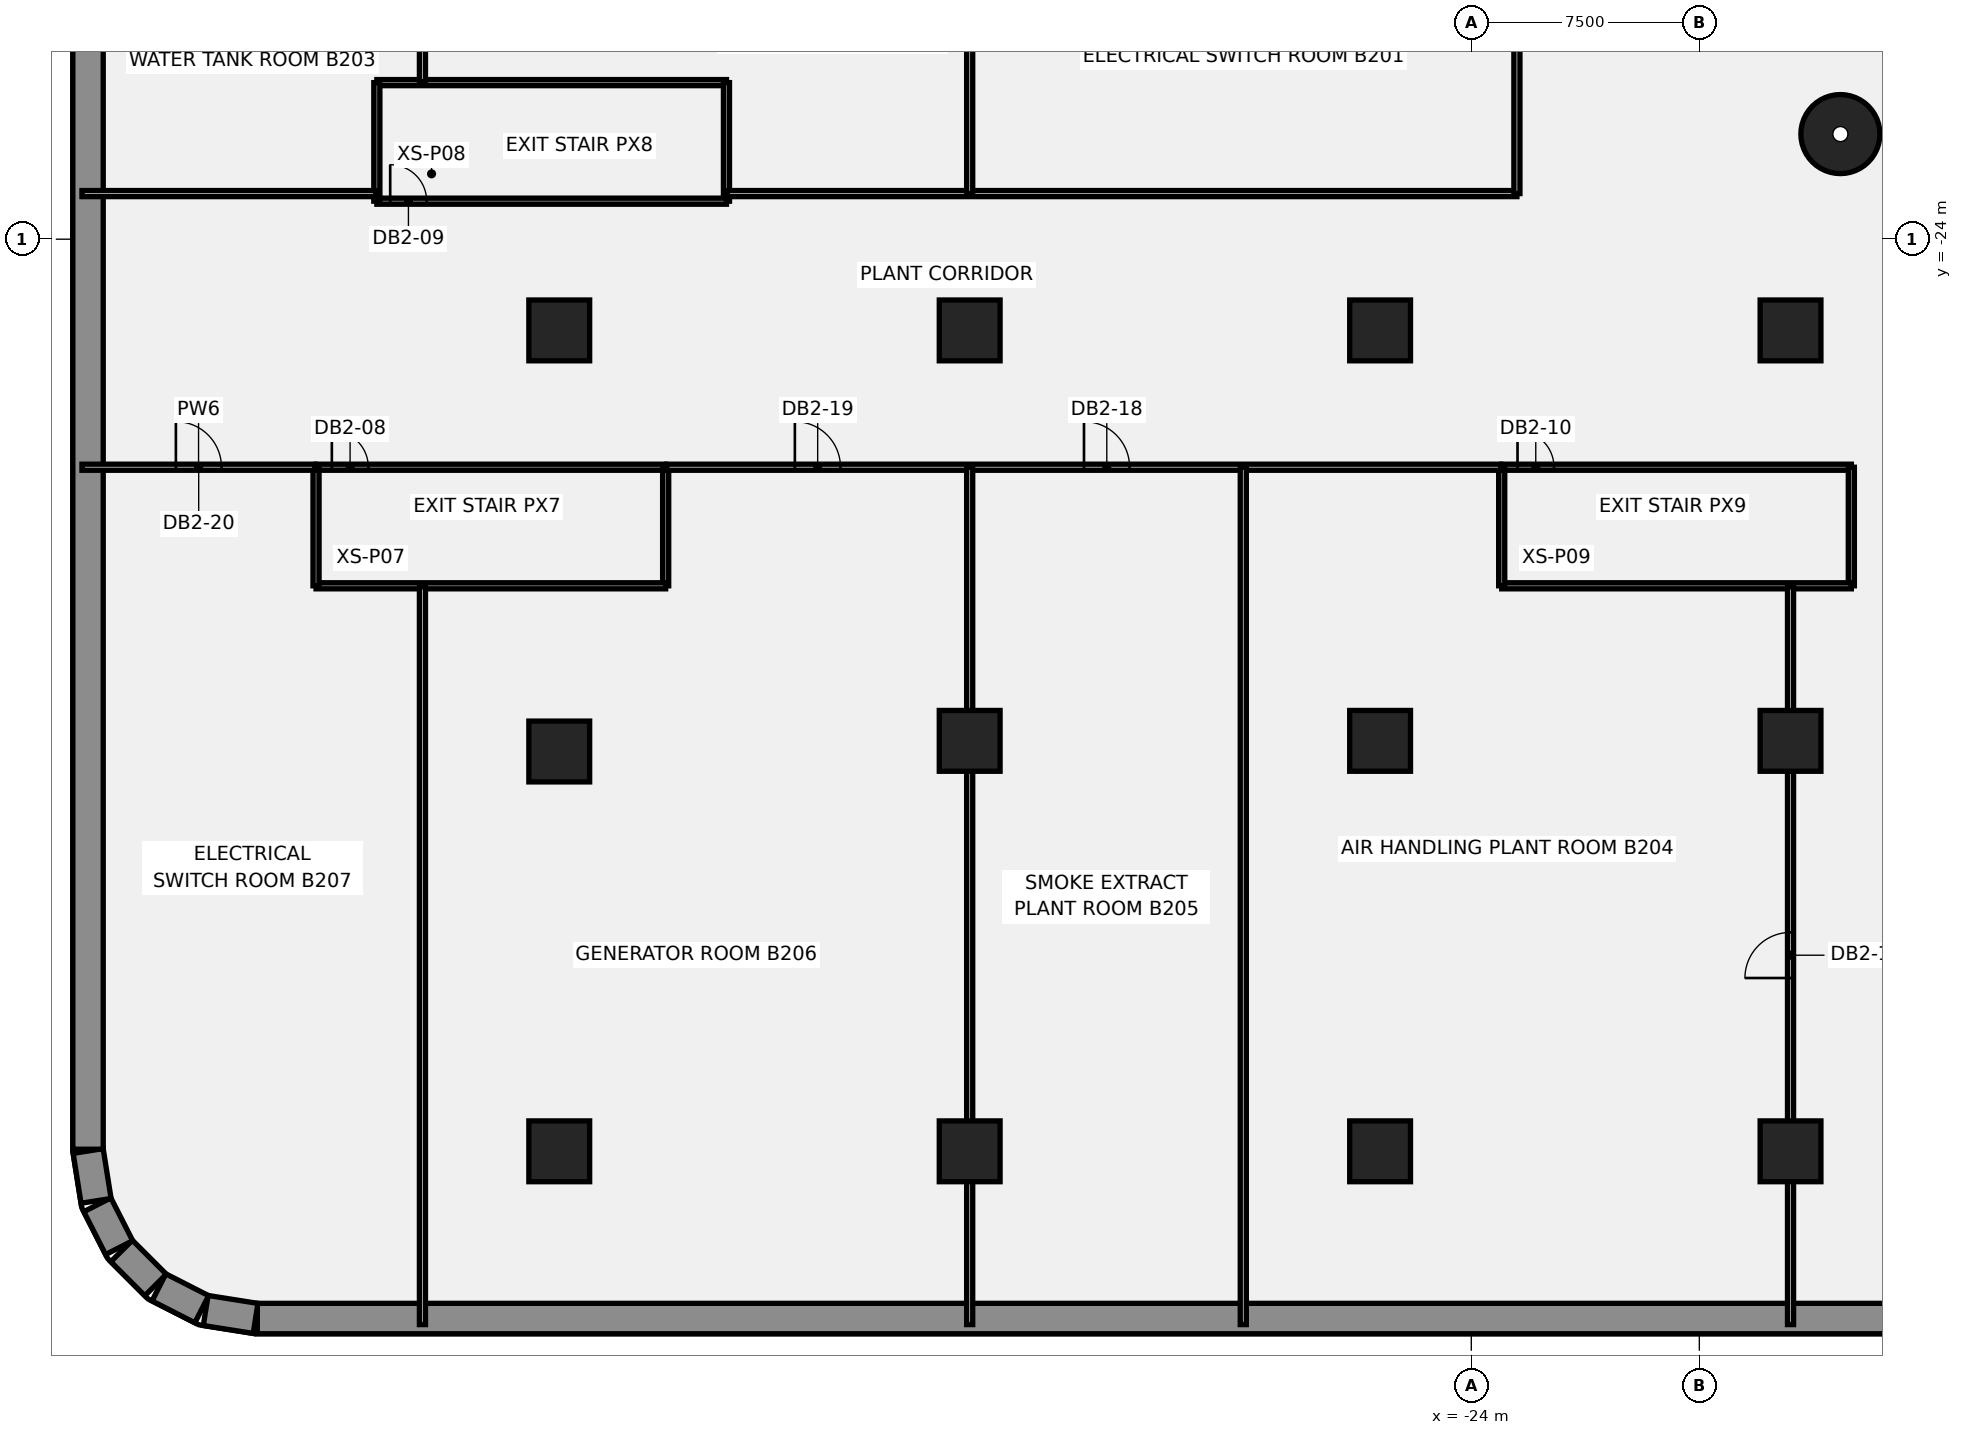
"""IFC4 building model, lengths in metres.
Left out: names, types, materials, properties, quantities, classifications, styles, units other than length and angle.
Written with IfcOpenShell. Run it as: python <this file> out.ifc"""

import sys

from ifc_helpers import new_model, si_unit, direction, frame, frame_2d, origin, origin_2d, place, context, subcontext, project, spatial, rectangle, circle, extrude, element, fill, save


model = new_model("IFC4")
c1 = context("Model", 3, precision=1e-05, world=origin(), true_north=direction((0.0, 1.0)))
c2 = subcontext(c1, "Body", "Model", "MODEL_VIEW")
j1 = project(units=[si_unit("LENGTHUNIT", "METRE"), si_unit("PLANEANGLEUNIT", "RADIAN")], contexts=[c1])
p1 = place(None, origin())
s1 = spatial("IfcSite", under=j1, at=p1, CompositionType="ELEMENT")
p2 = place(p1, origin())
s2 = spatial("IfcBuilding", under=s1, at=p2, CompositionType="ELEMENT")
p3 = place(p2, frame((0.0, 0.0, -14.0)))
s3 = spatial("IfcBuildingStorey", under=s2, at=p3, CompositionType="ELEMENT", Elevation=-14.0)
p4 = place(p3, frame((63.931, -59.5, -0.45), z_axis=(0.0, 0.0, 1.0), x_axis=(-1.0, 0.0, 0.0)))
e1 = element("IfcWall", 1, at=p4, inside=s3, PredefinedType="SOLIDWALL", context=c2, shape_type="SweptSolid", body=[
    extrude(rectangle(XDim=127.863, YDim=1.0, at=frame_2d((63.931, 0.0))), origin(), (0.0, 0.0, 1.0), 7.0),
])
p5 = place(p3, frame((-63.99, -59.495, -0.45), z_axis=(0.0, 0.0, 1.0), x_axis=(-0.987688946427, 0.156430639922, 0.0)))
e2 = element("IfcWall", 2, at=p5, inside=s3, PredefinedType="SOLIDWALL", context=c2, shape_type="SweptSolid", body=[
    extrude(rectangle(XDim=1.661, YDim=1.0, at=frame_2d((0.83, 0.0))), origin(), (0.0, 0.0, 1.0), 7.0),
])
for number, where, z_axis, x_axis in (
    (3, (-65.759, -59.194, -0.45), (0.0, 0.0, 1.0), (-0.891, 0.454, 0.0)),
    (4, (-67.278, -58.396, -0.45), (0.0, 0.0, 1.0), (-0.707, 0.707, 0.0)),
    (5, (-68.476, -57.168, -0.45), (0.0, 0.0, 1.0), (-0.454, 0.891, 0.0)),
):
    element("IfcWall", number, at=place(p3, frame(where, z_axis=z_axis, x_axis=x_axis)), inside=s3, PredefinedType="SOLIDWALL", context=c2, shape_type="SweptSolid", body=[
        extrude(rectangle(XDim=1.581, YDim=1.0, at=frame_2d((0.791, 0.0))), origin(), (0.0, 0.0, 1.0), 7.0),
    ])
p6 = place(p3, frame((-69.236, -55.63, -0.45), z_axis=(0.0, 0.0, 1.0), x_axis=(-0.156430639922, 0.987688946427, 0.0)))
e6 = element("IfcWall", 6, at=p6, inside=s3, PredefinedType="SOLIDWALL", context=c2, shape_type="SweptSolid", body=[
    extrude(rectangle(XDim=1.661, YDim=1.0, at=frame_2d((0.83, 0.0))), origin(), (0.0, 0.0, 1.0), 7.0),
])
p7 = place(p3, frame((-69.5, -53.931, -0.45), z_axis=(0.0, 0.0, 1.0), x_axis=(0.0, 1.0, 0.0)))
e7 = element("IfcWall", 7, at=p7, inside=s3, PredefinedType="SOLIDWALL", context=c2, shape_type="SweptSolid", body=[
    extrude(rectangle(XDim=107.863, YDim=1.0, at=frame_2d((53.931, 0.0))), origin(), (0.0, 0.0, 1.0), 7.0),
])
p8 = place(p3, frame((-11.86, -20.543, -0.45), z_axis=(0.0, 0.0, 1.0), x_axis=(1.0, 0.0, 0.0)))
e8 = element("IfcColumn", 8, at=p8, inside=s3, PredefinedType="COLUMN", context=c2, shape_type="SweptSolid", body=[
    extrude(circle(Radius=1.3, at=origin_2d()), origin(), (0.0, 0.0, 1.0), 7.0),
])
for number, where, z_axis, x_axis in (
    (9, (-54.0, -54.0, -0.45), (0.0, 0.0, 1.0), (1.0, 0.0, 0.0)),
    (10, (-54.0, -40.85, -0.45), (0.0, 0.0, 1.0), (1.0, 0.0, 0.0)),
    (11, (-54.0, -27.0, -0.45), (0.0, 0.0, 1.0), (1.0, 0.0, 0.0)),
    (12, (-40.5, -54.0, -0.45), (0.0, 0.0, 1.0), (1.0, 0.0, 0.0)),
    (13, (-40.5, -40.5, -0.45), (0.0, 0.0, 1.0), (1.0, 0.0, 0.0)),
    (14, (-40.5, -27.0, -0.45), (0.0, 0.0, 1.0), (1.0, 0.0, 0.0)),
    (15, (-27.0, -54.0, -0.45), (0.0, 0.0, 1.0), (1.0, 0.0, 0.0)),
    (16, (-27.0, -40.5, -0.45), (0.0, 0.0, 1.0), (1.0, 0.0, 0.0)),
    (17, (-27.0, -27.0, -0.45), (0.0, 0.0, 1.0), (1.0, 0.0, 0.0)),
    (18, (-13.5, -54.0, -0.45), (0.0, 0.0, 1.0), (1.0, 0.0, 0.0)),
    (19, (-13.5, -40.5, -0.45), (0.0, 0.0, 1.0), (1.0, 0.0, 0.0)),
    (20, (-13.5, -27.0, -0.45), (0.0, 0.0, 1.0), (1.0, 0.0, 0.0)),
):
    element("IfcColumn", number, at=place(p3, frame(where, z_axis=z_axis, x_axis=x_axis)), inside=s3, PredefinedType="COLUMN", context=c2, shape_type="SweptSolid", body=[
        extrude(rectangle(XDim=2.0, YDim=2.0, at=origin_2d()), origin(), (0.0, 0.0, 1.0), 7.0),
    ])
p9 = place(p3, frame((-62.0, -31.5, 0.0), z_axis=(0.0, 0.0, 1.0), x_axis=(1.0, 0.0, 0.0)))
e21 = element("IfcWall", 21, at=p9, inside=s3, PredefinedType="PARTITIONING", context=c2, shape_type="SweptSolid", body=[
    extrude(rectangle(XDim=11.5, YDim=0.2, at=frame_2d((5.75, 0.0))), origin(), (0.0, 0.0, 1.0), 6.55),
])
p10 = place(p9, frame((0.52, 0.0, 0.0)))
e22 = element("IfcOpeningElement", 22, at=p10, cuts=e21, PredefinedType="OPENING", context=c2, shape_type="SweptSolid", body=[
    extrude(rectangle(XDim=1.2, YDim=2.1, at=frame_2d((0.6, 1.05))), frame((0.0, 0.11, 0.0), z_axis=(0.0, -1.0, 0.0), x_axis=(1.0, 0.0, 0.0)), (0.0, 0.0, 1.0), 0.22),
])
p11 = place(p3, frame((-50.5, -35.4, 0.0), z_axis=(0.0, 0.0, 1.0), x_axis=(0.0, 1.0, 0.0)))
e23 = element("IfcWall", 23, at=p11, inside=s3, PredefinedType="PARTITIONING", context=c2, shape_type="SweptSolid", body=[
    extrude(rectangle(XDim=3.9, YDim=0.2, at=frame_2d((1.95, 0.0))), origin(), (0.0, 0.0, 1.0), 6.55),
])
p12 = place(p3, frame((-62.0, -35.4, 0.0), z_axis=(0.0, 0.0, 1.0), x_axis=(1.0, 0.0, 0.0)))
e24 = element("IfcWall", 24, at=p12, inside=s3, PredefinedType="PARTITIONING", context=c2, shape_type="SweptSolid", body=[
    extrude(rectangle(XDim=11.5, YDim=0.2, at=frame_2d((5.75, 0.0))), origin(), (0.0, 0.0, 1.0), 6.55),
])
p13 = place(p3, frame((-62.0, -35.4, 0.0), z_axis=(0.0, 0.0, 1.0), x_axis=(0.0, 1.0, 0.0)))
e25 = element("IfcWall", 25, at=p13, inside=s3, PredefinedType="PARTITIONING", context=c2, shape_type="SweptSolid", body=[
    extrude(rectangle(XDim=3.9, YDim=0.2, at=frame_2d((1.95, 0.0))), origin(), (0.0, 0.0, 1.0), 6.55),
])
p14 = place(p3, frame((-60.0, -18.85, 0.0), z_axis=(0.0, 0.0, 1.0), x_axis=(1.0, 0.0, 0.0)))
e26 = element("IfcWall", 26, at=p14, inside=s3, PredefinedType="PARTITIONING", context=c2, shape_type="SweptSolid", body=[
    extrude(rectangle(XDim=11.5, YDim=0.2, at=frame_2d((5.75, 0.0))), origin(), (0.0, 0.0, 1.0), 6.55),
])
p15 = place(p3, frame((-48.5, -22.75, 0.0), z_axis=(0.0, 0.0, 1.0), x_axis=(0.0, 1.0, 0.0)))
e27 = element("IfcWall", 27, at=p15, inside=s3, PredefinedType="PARTITIONING", context=c2, shape_type="SweptSolid", body=[
    extrude(rectangle(XDim=3.9, YDim=0.2, at=frame_2d((1.95, 0.0))), origin(), (0.0, 0.0, 1.0), 6.55),
])
p16 = place(p3, frame((-60.0, -22.75, 0.0), z_axis=(0.0, 0.0, 1.0), x_axis=(1.0, 0.0, 0.0)))
e28 = element("IfcWall", 28, at=p16, inside=s3, PredefinedType="PARTITIONING", context=c2, shape_type="SweptSolid", body=[
    extrude(rectangle(XDim=11.5, YDim=0.2, at=frame_2d((5.75, 0.0))), origin(), (0.0, 0.0, 1.0), 6.55),
])
p17 = place(p16, frame((0.439, 0.0, 0.0)))
e29 = element("IfcOpeningElement", 29, at=p17, cuts=e28, PredefinedType="OPENING", context=c2, shape_type="SweptSolid", body=[
    extrude(rectangle(XDim=1.2, YDim=2.1, at=frame_2d((0.6, 1.05))), frame((0.0, 0.11, 0.0), z_axis=(0.0, -1.0, 0.0), x_axis=(1.0, 0.0, 0.0)), (0.0, 0.0, 1.0), 0.22),
])
p18 = place(p3, frame((-60.0, -22.75, 0.0), z_axis=(0.0, 0.0, 1.0), x_axis=(0.0, 1.0, 0.0)))
e30 = element("IfcWall", 30, at=p18, inside=s3, PredefinedType="PARTITIONING", context=c2, shape_type="SweptSolid", body=[
    extrude(rectangle(XDim=3.9, YDim=0.2, at=frame_2d((1.95, 0.0))), origin(), (0.0, 0.0, 1.0), 6.55),
])
p19 = place(p3, frame((-23.0, -31.5, 0.0), z_axis=(0.0, 0.0, 1.0), x_axis=(1.0, 0.0, 0.0)))
e31 = element("IfcWall", 31, at=p19, inside=s3, PredefinedType="PARTITIONING", context=c2, shape_type="SweptSolid", body=[
    extrude(rectangle(XDim=11.5, YDim=0.2, at=frame_2d((5.75, 0.0))), origin(), (0.0, 0.0, 1.0), 6.55),
])
p20 = place(p19, frame((0.52, 0.0, 0.0)))
e32 = element("IfcOpeningElement", 32, at=p20, cuts=e31, PredefinedType="OPENING", context=c2, shape_type="SweptSolid", body=[
    extrude(rectangle(XDim=1.2, YDim=2.1, at=frame_2d((0.6, 1.05))), frame((0.0, 0.11, 0.0), z_axis=(0.0, -1.0, 0.0), x_axis=(1.0, 0.0, 0.0)), (0.0, 0.0, 1.0), 0.22),
])
p21 = place(p3, frame((-11.5, -35.4, 0.0), z_axis=(0.0, 0.0, 1.0), x_axis=(0.0, 1.0, 0.0)))
e33 = element("IfcWall", 33, at=p21, inside=s3, PredefinedType="PARTITIONING", context=c2, shape_type="SweptSolid", body=[
    extrude(rectangle(XDim=3.9, YDim=0.2, at=frame_2d((1.95, 0.0))), origin(), (0.0, 0.0, 1.0), 6.55),
])
p22 = place(p3, frame((-23.0, -35.4, 0.0), z_axis=(0.0, 0.0, 1.0), x_axis=(1.0, 0.0, 0.0)))
e34 = element("IfcWall", 34, at=p22, inside=s3, PredefinedType="PARTITIONING", context=c2, shape_type="SweptSolid", body=[
    extrude(rectangle(XDim=11.5, YDim=0.2, at=frame_2d((5.75, 0.0))), origin(), (0.0, 0.0, 1.0), 6.55),
])
p23 = place(p3, frame((-23.0, -35.4, 0.0), z_axis=(0.0, 0.0, 1.0), x_axis=(0.0, 1.0, 0.0)))
e35 = element("IfcWall", 35, at=p23, inside=s3, PredefinedType="PARTITIONING", context=c2, shape_type="SweptSolid", body=[
    extrude(rectangle(XDim=3.9, YDim=0.2, at=frame_2d((1.95, 0.0))), origin(), (0.0, 0.0, 1.0), 6.55),
])
p24 = place(p3, frame((-69.699, -31.5, 0.0), z_axis=(0.0, 0.0, 1.0), x_axis=(1.0, 0.0, 0.0)))
e36 = element("IfcWall", 36, at=p24, inside=s3, PredefinedType="PARTITIONING", context=c2, shape_type="SweptSolid", body=[
    extrude(rectangle(XDim=7.669, YDim=0.2, at=frame_2d((3.834, 0.0))), origin(), (0.0, 0.0, 1.0), 6.55),
])
p25 = place(p24, frame((3.089, 0.0, 0.0)))
e37 = element("IfcOpeningElement", 37, at=p25, cuts=e36, PredefinedType="OPENING", context=c2, shape_type="SweptSolid", body=[
    extrude(rectangle(XDim=1.5, YDim=2.1, at=frame_2d((0.75, 1.05))), frame((0.0, 0.11, 0.0), z_axis=(0.0, -1.0, 0.0), x_axis=(1.0, 0.0, 0.0)), (0.0, 0.0, 1.0), 0.22),
])
p26 = place(p3, frame((-69.699, -22.5, 0.0), z_axis=(0.0, 0.0, 1.0), x_axis=(1.0, 0.0, 0.0)))
e38 = element("IfcWall", 38, at=p26, inside=s3, PredefinedType="PARTITIONING", context=c2, shape_type="SweptSolid", body=[
    extrude(rectangle(XDim=9.669, YDim=0.2, at=frame_2d((4.834, 0.0))), origin(), (0.0, 0.0, 1.0), 6.55),
])
p27 = place(p3, frame((-58.5, -59.699, 0.0), z_axis=(0.0, 0.0, 1.0), x_axis=(0.0, 1.0, 0.0)))
e39 = element("IfcWall", 39, at=p27, inside=s3, PredefinedType="PARTITIONING", context=c2, shape_type="SweptSolid", body=[
    extrude(rectangle(XDim=24.269, YDim=0.2, at=frame_2d((12.135, 0.0))), origin(), (0.0, 0.0, 1.0), 6.55),
])
p28 = place(p3, frame((-58.5, -18.82, 0.0), z_axis=(0.0, 0.0, 1.0), x_axis=(0.0, 1.0, 0.0)))
e40 = element("IfcWall", 40, at=p28, inside=s3, PredefinedType="PARTITIONING", context=c2, shape_type="SweptSolid", body=[
    extrude(rectangle(XDim=5.32, YDim=0.2, at=frame_2d((2.66, 0.0))), origin(), (0.0, 0.0, 1.0), 6.55),
])
p29 = place(p3, frame((-50.47, -31.5, 0.0), z_axis=(0.0, 0.0, 1.0), x_axis=(1.0, 0.0, 0.0)))
e41 = element("IfcWall", 41, at=p29, inside=s3, PredefinedType="PARTITIONING", context=c2, shape_type="SweptSolid", body=[
    extrude(rectangle(XDim=27.44, YDim=0.2, at=frame_2d((13.72, 0.0))), origin(), (0.0, 0.0, 1.0), 6.55),
])
p30 = place(p29, frame((13.73, 0.0, 0.0)))
e42 = element("IfcOpeningElement", 42, at=p30, cuts=e41, PredefinedType="OPENING", context=c2, shape_type="SweptSolid", body=[
    extrude(rectangle(XDim=1.5, YDim=2.1, at=frame_2d((0.75, 1.05))), frame((0.0, 0.11, 0.0), z_axis=(0.0, -1.0, 0.0), x_axis=(1.0, 0.0, 0.0)), (0.0, 0.0, 1.0), 0.22),
])
p31 = place(p29, frame((4.22, 0.0, 0.0)))
e43 = element("IfcOpeningElement", 43, at=p31, cuts=e41, PredefinedType="OPENING", context=c2, shape_type="SweptSolid", body=[
    extrude(rectangle(XDim=1.5, YDim=2.1, at=frame_2d((0.75, 1.05))), frame((0.0, 0.11, 0.0), z_axis=(0.0, -1.0, 0.0), x_axis=(1.0, 0.0, 0.0)), (0.0, 0.0, 1.0), 0.22),
])
p32 = place(p3, frame((-48.47, -22.5, 0.0), z_axis=(0.0, 0.0, 1.0), x_axis=(1.0, 0.0, 0.0)))
e44 = element("IfcWall", 44, at=p32, inside=s3, PredefinedType="PARTITIONING", context=c2, shape_type="SweptSolid", body=[
    extrude(rectangle(XDim=25.97, YDim=0.2, at=frame_2d((12.985, 0.0))), origin(), (0.0, 0.0, 1.0), 6.55),
])
p33 = place(p3, frame((-40.5, -59.699, 0.0), z_axis=(0.0, 0.0, 1.0), x_axis=(0.0, 1.0, 0.0)))
e45 = element("IfcWall", 45, at=p33, inside=s3, PredefinedType="PARTITIONING", context=c2, shape_type="SweptSolid", body=[
    extrude(rectangle(XDim=28.199, YDim=0.2, at=frame_2d((14.1, 0.0))), origin(), (0.0, 0.0, 1.0), 6.55),
])
for number, where, z_axis, x_axis in (
    (46, (-22.5, -22.5, 0.0), (0.0, 0.0, 1.0), (0.0, 1.0, 0.0)),
    (47, (-40.5, -22.5, 0.0), (0.0, 0.0, 1.0), (0.0, 1.0, 0.0)),
):
    element("IfcWall", number, at=place(p3, frame(where, z_axis=z_axis, x_axis=x_axis)), inside=s3, PredefinedType="PARTITIONING", context=c2, shape_type="SweptSolid", body=[
        extrude(rectangle(XDim=9.0, YDim=0.2, at=frame_2d((4.5, 0.0))), origin(), (0.0, 0.0, 1.0), 6.55),
    ])
p34 = place(p3, frame((-31.5, -59.699, 0.0), z_axis=(0.0, 0.0, 1.0), x_axis=(0.0, 1.0, 0.0)))
e48 = element("IfcWall", 48, at=p34, inside=s3, PredefinedType="PARTITIONING", context=c2, shape_type="SweptSolid", body=[
    extrude(rectangle(XDim=28.199, YDim=0.2, at=frame_2d((14.1, 0.0))), origin(), (0.0, 0.0, 1.0), 6.55),
])
p35 = place(p3, frame((-13.5, -59.699, 0.0), z_axis=(0.0, 0.0, 1.0), x_axis=(0.0, 1.0, 0.0)))
e49 = element("IfcWall", 49, at=p35, inside=s3, PredefinedType="PARTITIONING", context=c2, shape_type="SweptSolid", body=[
    extrude(rectangle(XDim=24.269, YDim=0.2, at=frame_2d((12.135, 0.0))), origin(), (0.0, 0.0, 1.0), 6.55),
])
p36 = place(p35, frame((11.399, 0.0, 0.0)))
e50 = element("IfcOpeningElement", 50, at=p36, cuts=e49, PredefinedType="OPENING", context=c2, shape_type="SweptSolid", body=[
    extrude(rectangle(XDim=1.5, YDim=2.1, at=frame_2d((0.75, 1.05))), frame((0.0, 0.11, 0.0), z_axis=(0.0, -1.0, 0.0), x_axis=(1.0, 0.0, 0.0)), (0.0, 0.0, 1.0), 0.22),
])
p37 = place(p10, origin())
e51 = element("IfcDoor", 51, at=p37, inside=s3, OperationType="SINGLE_SWING_RIGHT", PredefinedType="DOOR", context=c2, shape_type="SweptSolid", body=[
    extrude(rectangle(XDim=1.2, YDim=2.1, at=frame_2d((0.6, 1.05))), frame((0.0, 0.025, 0.0), z_axis=(0.0, -1.0, 0.0), x_axis=(1.0, 0.0, 0.0)), (0.0, 0.0, 1.0), 0.05),
])
fill(e22, e51)
p38 = place(p17, origin())
e52 = element("IfcDoor", 52, at=p38, inside=s3, OperationType="SINGLE_SWING_LEFT", PredefinedType="DOOR", context=c2, shape_type="SweptSolid", body=[
    extrude(rectangle(XDim=1.2, YDim=2.1, at=frame_2d((0.6, 1.05))), frame((0.0, 0.025, 0.0), z_axis=(0.0, -1.0, 0.0), x_axis=(1.0, 0.0, 0.0)), (0.0, 0.0, 1.0), 0.05),
])
fill(e29, e52)
p39 = place(p20, origin())
e53 = element("IfcDoor", 53, at=p39, inside=s3, OperationType="SINGLE_SWING_RIGHT", PredefinedType="DOOR", context=c2, shape_type="SweptSolid", body=[
    extrude(rectangle(XDim=1.2, YDim=2.1, at=frame_2d((0.6, 1.05))), frame((0.0, 0.025, 0.0), z_axis=(0.0, -1.0, 0.0), x_axis=(1.0, 0.0, 0.0)), (0.0, 0.0, 1.0), 0.05),
])
fill(e32, e53)
p40 = place(p36, origin())
e54 = element("IfcDoor", 54, at=p40, inside=s3, OperationType="SINGLE_SWING_LEFT", PredefinedType="DOOR", context=c2, shape_type="SweptSolid", body=[
    extrude(rectangle(XDim=1.5, YDim=2.1, at=frame_2d((0.75, 1.05))), frame((0.0, 0.025, 0.0), z_axis=(0.0, -1.0, 0.0), x_axis=(1.0, 0.0, 0.0)), (0.0, 0.0, 1.0), 0.05),
])
fill(e50, e54)
p41 = place(p30, origin())
e55 = element("IfcDoor", 55, at=p41, inside=s3, OperationType="SINGLE_SWING_RIGHT", PredefinedType="DOOR", context=c2, shape_type="SweptSolid", body=[
    extrude(rectangle(XDim=1.5, YDim=2.1, at=frame_2d((0.75, 1.05))), frame((0.0, 0.025, 0.0), z_axis=(0.0, -1.0, 0.0), x_axis=(1.0, 0.0, 0.0)), (0.0, 0.0, 1.0), 0.05),
])
fill(e42, e55)
p42 = place(p31, origin())
e56 = element("IfcDoor", 56, at=p42, inside=s3, OperationType="SINGLE_SWING_LEFT", PredefinedType="DOOR", context=c2, shape_type="SweptSolid", body=[
    extrude(rectangle(XDim=1.5, YDim=2.1, at=frame_2d((0.75, 1.05))), frame((0.0, 0.025, 0.0), z_axis=(0.0, -1.0, 0.0), x_axis=(1.0, 0.0, 0.0)), (0.0, 0.0, 1.0), 0.05),
])
fill(e43, e56)
p43 = place(p25, origin())
e57 = element("IfcDoor", 57, at=p43, inside=s3, OperationType="SINGLE_SWING_RIGHT", PredefinedType="DOOR", context=c2, shape_type="SweptSolid", body=[
    extrude(rectangle(XDim=1.5, YDim=2.1, at=frame_2d((0.75, 1.05))), frame((0.0, 0.025, 0.0), z_axis=(0.0, -1.0, 0.0), x_axis=(1.0, 0.0, 0.0)), (0.0, 0.0, 1.0), 0.05),
])
fill(e37, e57)
save(model, sys.argv[1])
